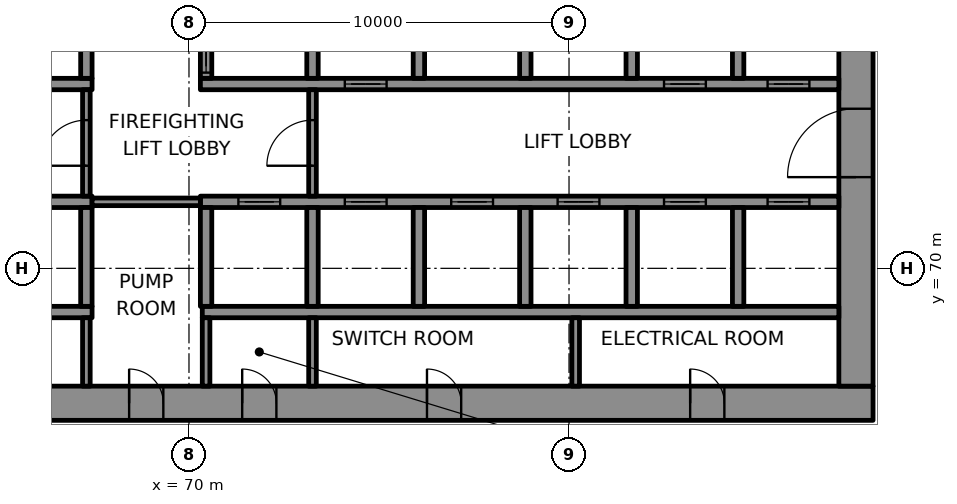
"""IFC4 building model, lengths in metres.
Left out: names, types, materials, properties, quantities, classifications, styles, units other than length and angle.
Written with IfcOpenShell. Run it as: python <this file> out.ifc"""

import sys

from ifc_helpers import new_model, si_unit, direction, frame, frame_2d, origin, place, context, subcontext, project, spatial, rectangle, extrude, element, fill, save


model = new_model("IFC4")
c1 = context("Model", 3, precision=1e-05, world=origin(), true_north=direction((0.0, 1.0)))
c2 = subcontext(c1, "Body", "Model", "MODEL_VIEW")
j1 = project(units=[si_unit("LENGTHUNIT", "METRE"), si_unit("PLANEANGLEUNIT", "RADIAN")], contexts=[c1])
p1 = place(None, origin())
s1 = spatial("IfcSite", under=j1, at=p1, CompositionType="ELEMENT")
p2 = place(p1, origin())
s2 = spatial("IfcBuilding", under=s1, at=p2, CompositionType="ELEMENT")
p3 = place(p2, frame((0.0, 0.0, 44.2)))
s3 = spatial("IfcBuildingStorey", under=s2, at=p3, CompositionType="ELEMENT", Elevation=44.2)
p4 = place(p3, frame((62.0, 66.45, 0.0), z_axis=(0.0, 0.0, 1.0), x_axis=(1.0, 0.0, 0.0)))
e1 = element("IfcWall", 1, at=p4, inside=s3, PredefinedType="SHEAR", context=c2, shape_type="SweptSolid", body=[
    extrude(rectangle(XDim=26.0, YDim=0.9, at=frame_2d((13.0, 0.0))), origin(), (0.0, 0.0, 1.0), 4.0),
])
p5 = place(p4, frame((3.45, 0.0, 0.0)))
e2 = element("IfcOpeningElement", 2, at=p5, cuts=e1, PredefinedType="OPENING", context=c2, shape_type="SweptSolid", body=[
    extrude(rectangle(XDim=0.9, YDim=2.1, at=frame_2d((0.45, 1.05))), frame((0.0, 0.46, 0.0), z_axis=(0.0, -1.0, 0.0), x_axis=(1.0, 0.0, 0.0)), (0.0, 0.0, 1.0), 0.92),
])
p6 = place(p4, frame((6.425, 0.0, 0.0)))
e3 = element("IfcOpeningElement", 3, at=p6, cuts=e1, PredefinedType="OPENING", context=c2, shape_type="SweptSolid", body=[
    extrude(rectangle(XDim=0.9, YDim=2.1, at=frame_2d((0.45, 1.05))), frame((0.0, 0.46, 0.0), z_axis=(0.0, -1.0, 0.0), x_axis=(1.0, 0.0, 0.0)), (0.0, 0.0, 1.0), 0.92),
])
p7 = place(p4, frame((9.4, 0.0, 0.0)))
e4 = element("IfcOpeningElement", 4, at=p7, cuts=e1, PredefinedType="OPENING", context=c2, shape_type="SweptSolid", body=[
    extrude(rectangle(XDim=0.9, YDim=2.1, at=frame_2d((0.45, 1.05))), frame((0.0, 0.46, 0.0), z_axis=(0.0, -1.0, 0.0), x_axis=(1.0, 0.0, 0.0)), (0.0, 0.0, 1.0), 0.92),
])
p8 = place(p4, frame((14.262, 0.0, 0.0)))
e5 = element("IfcOpeningElement", 5, at=p8, cuts=e1, PredefinedType="OPENING", context=c2, shape_type="SweptSolid", body=[
    extrude(rectangle(XDim=0.9, YDim=2.1, at=frame_2d((0.45, 1.05))), frame((0.0, 0.46, 0.0), z_axis=(0.0, -1.0, 0.0), x_axis=(1.0, 0.0, 0.0)), (0.0, 0.0, 1.0), 0.92),
])
p9 = place(p4, frame((21.188, 0.0, 0.0)))
e6 = element("IfcOpeningElement", 6, at=p9, cuts=e1, PredefinedType="OPENING", context=c2, shape_type="SweptSolid", body=[
    extrude(rectangle(XDim=0.9, YDim=2.1, at=frame_2d((0.45, 1.05))), frame((0.0, 0.46, 0.0), z_axis=(0.0, -1.0, 0.0), x_axis=(1.0, 0.0, 0.0)), (0.0, 0.0, 1.0), 0.92),
])
p10 = place(p3, frame((87.55, 66.9, 0.0), z_axis=(0.0, 0.0, 1.0), x_axis=(0.0, 1.0, 0.0)))
e7 = element("IfcWall", 7, at=p10, inside=s3, PredefinedType="SHEAR", context=c2, shape_type="SweptSolid", body=[
    extrude(rectangle(XDim=16.2, YDim=0.9, at=frame_2d((8.1, 0.0))), origin(), (0.0, 0.0, 1.0), 4.0),
])
p11 = place(p10, frame((5.5, 0.0, 0.0)))
e8 = element("IfcOpeningElement", 8, at=p11, cuts=e7, PredefinedType="OPENING", context=c2, shape_type="SweptSolid", body=[
    extrude(rectangle(XDim=1.8, YDim=2.1, at=frame_2d((0.9, 1.05))), frame((0.0, 0.46, 0.0), z_axis=(0.0, -1.0, 0.0), x_axis=(1.0, 0.0, 0.0)), (0.0, 0.0, 1.0), 0.92),
])
p12 = place(p10, frame((11.738, 0.0, 0.0)))
e9 = element("IfcOpeningElement", 9, at=p12, cuts=e7, PredefinedType="OPENING", context=c2, shape_type="SweptSolid", body=[
    extrude(rectangle(XDim=0.9, YDim=2.1, at=frame_2d((0.45, 1.05))), frame((0.0, 0.46, 0.0), z_axis=(0.0, -1.0, 0.0), x_axis=(1.0, 0.0, 0.0)), (0.0, 0.0, 1.0), 0.92),
])
p13 = place(p3, frame((64.35, 68.85, 0.0), z_axis=(0.0, 0.0, 1.0), x_axis=(1.0, 0.0, 0.0)))
e10 = element("IfcWall", 10, at=p13, inside=s3, PredefinedType="SHEAR", context=c2, shape_type="SweptSolid", body=[
    extrude(rectangle(XDim=3.1, YDim=0.3, at=frame_2d((1.55, 0.0))), origin(), (0.0, 0.0, 1.0), 4.0),
])
p14 = place(p3, frame((70.35, 68.85, 0.0), z_axis=(0.0, 0.0, 1.0), x_axis=(1.0, 0.0, 0.0)))
e11 = element("IfcWall", 11, at=p14, inside=s3, PredefinedType="SHEAR", context=c2, shape_type="SweptSolid", body=[
    extrude(rectangle(XDim=16.75, YDim=0.3, at=frame_2d((8.375, 0.0))), origin(), (0.0, 0.0, 1.0), 4.0),
])
p15 = place(p3, frame((64.35, 71.75, 0.0), z_axis=(0.0, 0.0, 1.0), x_axis=(1.0, 0.0, 0.0)))
e12 = element("IfcWall", 12, at=p15, inside=s3, PredefinedType="SHEAR", context=c2, shape_type="SweptSolid", body=[
    extrude(rectangle(XDim=3.1, YDim=0.3, at=frame_2d((1.55, 0.0))), origin(), (0.0, 0.0, 1.0), 4.0),
])
p16 = place(p3, frame((70.3, 71.75, 0.0), z_axis=(0.0, 0.0, 1.0), x_axis=(1.0, 0.0, 0.0)))
e13 = element("IfcWall", 13, at=p16, inside=s3, PredefinedType="SHEAR", context=c2, shape_type="SweptSolid", body=[
    extrude(rectangle(XDim=16.8, YDim=0.3, at=frame_2d((8.4, 0.0))), origin(), (0.0, 0.0, 1.0), 4.0),
])
p17 = place(p16, frame((1.0, 0.0, 0.0)))
e14 = element("IfcOpeningElement", 14, at=p17, cuts=e13, PredefinedType="OPENING", context=c2, shape_type="SweptSolid", body=[
    extrude(rectangle(XDim=1.1, YDim=2.1, at=frame_2d((0.55, 1.05))), frame((0.0, 0.16, 0.0), z_axis=(0.0, -1.0, 0.0), x_axis=(1.0, 0.0, 0.0)), (0.0, 0.0, 1.0), 0.32),
])
p18 = place(p16, frame((3.8, 0.0, 0.0)))
e15 = element("IfcOpeningElement", 15, at=p18, cuts=e13, PredefinedType="OPENING", context=c2, shape_type="SweptSolid", body=[
    extrude(rectangle(XDim=1.1, YDim=2.1, at=frame_2d((0.55, 1.05))), frame((0.0, 0.16, 0.0), z_axis=(0.0, -1.0, 0.0), x_axis=(1.0, 0.0, 0.0)), (0.0, 0.0, 1.0), 0.32),
])
p19 = place(p16, frame((6.6, 0.0, 0.0)))
e16 = element("IfcOpeningElement", 16, at=p19, cuts=e13, PredefinedType="OPENING", context=c2, shape_type="SweptSolid", body=[
    extrude(rectangle(XDim=1.1, YDim=2.1, at=frame_2d((0.55, 1.05))), frame((0.0, 0.16, 0.0), z_axis=(0.0, -1.0, 0.0), x_axis=(1.0, 0.0, 0.0)), (0.0, 0.0, 1.0), 0.32),
])
p20 = place(p16, frame((9.4, 0.0, 0.0)))
e17 = element("IfcOpeningElement", 17, at=p20, cuts=e13, PredefinedType="OPENING", context=c2, shape_type="SweptSolid", body=[
    extrude(rectangle(XDim=1.1, YDim=2.1, at=frame_2d((0.55, 1.05))), frame((0.0, 0.16, 0.0), z_axis=(0.0, -1.0, 0.0), x_axis=(1.0, 0.0, 0.0)), (0.0, 0.0, 1.0), 0.32),
])
p21 = place(p16, frame((12.2, 0.0, 0.0)))
e18 = element("IfcOpeningElement", 18, at=p21, cuts=e13, PredefinedType="OPENING", context=c2, shape_type="SweptSolid", body=[
    extrude(rectangle(XDim=1.1, YDim=2.1, at=frame_2d((0.55, 1.05))), frame((0.0, 0.16, 0.0), z_axis=(0.0, -1.0, 0.0), x_axis=(1.0, 0.0, 0.0)), (0.0, 0.0, 1.0), 0.32),
])
p22 = place(p16, frame((14.925, 0.0, 0.0)))
e19 = element("IfcOpeningElement", 19, at=p22, cuts=e13, PredefinedType="OPENING", context=c2, shape_type="SweptSolid", body=[
    extrude(rectangle(XDim=1.1, YDim=2.1, at=frame_2d((0.55, 1.05))), frame((0.0, 0.16, 0.0), z_axis=(0.0, -1.0, 0.0), x_axis=(1.0, 0.0, 0.0)), (0.0, 0.0, 1.0), 0.32),
])
p23 = place(p3, frame((64.35, 74.85, 0.0), z_axis=(0.0, 0.0, 1.0), x_axis=(1.0, 0.0, 0.0)))
e20 = element("IfcWall", 20, at=p23, inside=s3, PredefinedType="SHEAR", context=c2, shape_type="SweptSolid", body=[
    extrude(rectangle(XDim=3.1, YDim=0.3, at=frame_2d((1.55, 0.0))), origin(), (0.0, 0.0, 1.0), 4.0),
])
p24 = place(p3, frame((70.3, 74.85, 0.0), z_axis=(0.0, 0.0, 1.0), x_axis=(1.0, 0.0, 0.0)))
e21 = element("IfcWall", 21, at=p24, inside=s3, PredefinedType="SHEAR", context=c2, shape_type="SweptSolid", body=[
    extrude(rectangle(XDim=16.8, YDim=0.3, at=frame_2d((8.4, 0.0))), origin(), (0.0, 0.0, 1.0), 4.0),
])
p25 = place(p24, frame((3.8, 0.0, 0.0)))
e22 = element("IfcOpeningElement", 22, at=p25, cuts=e21, PredefinedType="OPENING", context=c2, shape_type="SweptSolid", body=[
    extrude(rectangle(XDim=1.1, YDim=2.1, at=frame_2d((0.55, 1.05))), frame((0.0, 0.16, 0.0), z_axis=(0.0, -1.0, 0.0), x_axis=(1.0, 0.0, 0.0)), (0.0, 0.0, 1.0), 0.32),
])
p26 = place(p24, frame((12.2, 0.0, 0.0)))
e23 = element("IfcOpeningElement", 23, at=p26, cuts=e21, PredefinedType="OPENING", context=c2, shape_type="SweptSolid", body=[
    extrude(rectangle(XDim=1.1, YDim=2.1, at=frame_2d((0.55, 1.05))), frame((0.0, 0.16, 0.0), z_axis=(0.0, -1.0, 0.0), x_axis=(1.0, 0.0, 0.0)), (0.0, 0.0, 1.0), 0.32),
])
p27 = place(p24, frame((14.925, 0.0, 0.0)))
e24 = element("IfcOpeningElement", 24, at=p27, cuts=e21, PredefinedType="OPENING", context=c2, shape_type="SweptSolid", body=[
    extrude(rectangle(XDim=1.1, YDim=2.1, at=frame_2d((0.55, 1.05))), frame((0.0, 0.16, 0.0), z_axis=(0.0, -1.0, 0.0), x_axis=(1.0, 0.0, 0.0)), (0.0, 0.0, 1.0), 0.32),
])
for number, where, z_axis, x_axis in (
    (25, (67.3, 69.0, 0.0), (0.0, 0.0, 1.0), (0.0, 1.0, 0.0)),
    (26, (67.3, 75.0, 0.0), (0.0, 0.0, 1.0), (0.0, 1.0, 0.0)),
    (27, (70.45, 69.0, 0.0), (0.0, 0.0, 1.0), (0.0, 1.0, 0.0)),
):
    element("IfcWall", number, at=place(p3, frame(where, z_axis=z_axis, x_axis=x_axis)), inside=s3, PredefinedType="SHEAR", context=c2, shape_type="SweptSolid", body=[
        extrude(rectangle(XDim=2.6, YDim=0.3, at=frame_2d((1.3, 0.0))), origin(), (0.0, 0.0, 1.0), 4.0),
    ])
p28 = place(p3, frame((70.45, 75.0, 0.0), z_axis=(0.0, 0.0, 1.0), x_axis=(0.0, 1.0, 0.0)))
e28 = element("IfcWall", 28, at=p28, inside=s3, PredefinedType="SHEAR", context=c2, shape_type="SweptSolid", body=[
    extrude(rectangle(XDim=2.6, YDim=0.3, at=frame_2d((1.3, 0.0))), origin(), (0.0, 0.0, 1.0), 4.0),
])
p29 = place(p28, frame((0.15, 0.0, 0.0)))
e29 = element("IfcOpeningElement", 29, at=p29, cuts=e28, PredefinedType="OPENING", context=c2, shape_type="SweptSolid", body=[
    extrude(rectangle(XDim=1.1, YDim=2.1, at=frame_2d((0.55, 1.05))), frame((0.0, 0.16, 0.0), z_axis=(0.0, -1.0, 0.0), x_axis=(1.0, 0.0, 0.0)), (0.0, 0.0, 1.0), 0.32),
])
for number, where, z_axis, x_axis in (
    (30, (73.25, 69.0, 0.0), (0.0, 0.0, 1.0), (0.0, 1.0, 0.0)),
    (31, (73.25, 75.0, 0.0), (0.0, 0.0, 1.0), (0.0, 1.0, 0.0)),
    (32, (76.05, 69.0, 0.0), (0.0, 0.0, 1.0), (0.0, 1.0, 0.0)),
    (33, (76.05, 75.0, 0.0), (0.0, 0.0, 1.0), (0.0, 1.0, 0.0)),
    (34, (78.85, 69.0, 0.0), (0.0, 0.0, 1.0), (0.0, 1.0, 0.0)),
    (35, (78.85, 75.0, 0.0), (0.0, 0.0, 1.0), (0.0, 1.0, 0.0)),
    (36, (81.65, 69.0, 0.0), (0.0, 0.0, 1.0), (0.0, 1.0, 0.0)),
    (37, (81.65, 75.0, 0.0), (0.0, 0.0, 1.0), (0.0, 1.0, 0.0)),
    (38, (84.45, 69.0, 0.0), (0.0, 0.0, 1.0), (0.0, 1.0, 0.0)),
    (39, (84.45, 75.0, 0.0), (0.0, 0.0, 1.0), (0.0, 1.0, 0.0)),
):
    element("IfcWall", number, at=place(p3, frame(where, z_axis=z_axis, x_axis=x_axis)), inside=s3, PredefinedType="SHEAR", context=c2, shape_type="SweptSolid", body=[
        extrude(rectangle(XDim=2.6, YDim=0.3, at=frame_2d((1.3, 0.0))), origin(), (0.0, 0.0, 1.0), 4.0),
    ])
p30 = place(p3, frame((67.45, 71.75, 0.0), z_axis=(0.0, 0.0, 1.0), x_axis=(1.0, 0.0, 0.0)))
e40 = element("IfcWall", 40, at=p30, inside=s3, PredefinedType="PARTITIONING", context=c2, shape_type="SweptSolid", body=[
    extrude(rectangle(XDim=2.85, YDim=0.2, at=frame_2d((1.425, 0.0))), origin(), (0.0, 0.0, 1.0), 4.0),
])
p31 = place(p3, frame((67.3, 66.9, 0.0), z_axis=(0.0, 0.0, 1.0), x_axis=(0.0, 1.0, 0.0)))
e41 = element("IfcWall", 41, at=p31, inside=s3, PredefinedType="PARTITIONING", context=c2, shape_type="SweptSolid", body=[
    extrude(rectangle(XDim=1.8, YDim=0.2, at=frame_2d((0.9, 0.0))), origin(), (0.0, 0.0, 1.0), 4.0),
])
p32 = place(p3, frame((67.3, 71.9, 0.0), z_axis=(0.0, 0.0, 1.0), x_axis=(0.0, 1.0, 0.0)))
e42 = element("IfcWall", 42, at=p32, inside=s3, PredefinedType="PARTITIONING", context=c2, shape_type="SweptSolid", body=[
    extrude(rectangle(XDim=2.8, YDim=0.2, at=frame_2d((1.4, 0.0))), origin(), (0.0, 0.0, 1.0), 4.0),
])
p33 = place(p32, frame((0.8, 0.0, 0.0)))
e43 = element("IfcOpeningElement", 43, at=p33, cuts=e42, PredefinedType="OPENING", context=c2, shape_type="SweptSolid", body=[
    extrude(rectangle(XDim=1.2, YDim=2.1, at=frame_2d((0.6, 1.05))), frame((0.0, 0.11, 0.0), z_axis=(0.0, -1.0, 0.0), x_axis=(1.0, 0.0, 0.0)), (0.0, 0.0, 1.0), 0.22),
])
for number, where, z_axis, x_axis in (
    (44, (70.45, 66.9, 0.0), (0.0, 0.0, 1.0), (0.0, 1.0, 0.0)),
    (45, (73.25, 66.9, 0.0), (0.0, 0.0, 1.0), (0.0, 1.0, 0.0)),
):
    element("IfcWall", number, at=place(p3, frame(where, z_axis=z_axis, x_axis=x_axis)), inside=s3, PredefinedType="PARTITIONING", context=c2, shape_type="SweptSolid", body=[
        extrude(rectangle(XDim=1.8, YDim=0.2, at=frame_2d((0.9, 0.0))), origin(), (0.0, 0.0, 1.0), 4.0),
    ])
p34 = place(p3, frame((73.25, 71.9, 0.0), z_axis=(0.0, 0.0, 1.0), x_axis=(0.0, 1.0, 0.0)))
e46 = element("IfcWall", 46, at=p34, inside=s3, PredefinedType="PARTITIONING", context=c2, shape_type="SweptSolid", body=[
    extrude(rectangle(XDim=2.8, YDim=0.2, at=frame_2d((1.4, 0.0))), origin(), (0.0, 0.0, 1.0), 4.0),
])
p35 = place(p34, frame((0.8, 0.0, 0.0)))
e47 = element("IfcOpeningElement", 47, at=p35, cuts=e46, PredefinedType="OPENING", context=c2, shape_type="SweptSolid", body=[
    extrude(rectangle(XDim=1.2, YDim=2.1, at=frame_2d((0.6, 1.05))), frame((0.0, 0.11, 0.0), z_axis=(0.0, -1.0, 0.0), x_axis=(1.0, 0.0, 0.0)), (0.0, 0.0, 1.0), 0.22),
])
p36 = place(p3, frame((80.175, 66.9, 0.0), z_axis=(0.0, 0.0, 1.0), x_axis=(0.0, 1.0, 0.0)))
e48 = element("IfcWall", 48, at=p36, inside=s3, PredefinedType="PARTITIONING", context=c2, shape_type="SweptSolid", body=[
    extrude(rectangle(XDim=1.8, YDim=0.2, at=frame_2d((0.9, 0.0))), origin(), (0.0, 0.0, 1.0), 4.0),
])
p37 = place(p17, origin())
e49 = element("IfcDoor", 49, at=p37, inside=s3, OperationType="DOUBLE_DOOR_SLIDING", PredefinedType="DOOR", context=c2, shape_type="SweptSolid", body=[
    extrude(rectangle(XDim=1.1, YDim=2.1, at=frame_2d((0.55, 1.05))), frame((0.0, 0.025, 0.0), z_axis=(0.0, -1.0, 0.0), x_axis=(1.0, 0.0, 0.0)), (0.0, 0.0, 1.0), 0.05),
])
fill(e14, e49)
p38 = place(p18, origin())
e50 = element("IfcDoor", 50, at=p38, inside=s3, OperationType="DOUBLE_DOOR_SLIDING", PredefinedType="DOOR", context=c2, shape_type="SweptSolid", body=[
    extrude(rectangle(XDim=1.1, YDim=2.1, at=frame_2d((0.55, 1.05))), frame((0.0, 0.025, 0.0), z_axis=(0.0, -1.0, 0.0), x_axis=(1.0, 0.0, 0.0)), (0.0, 0.0, 1.0), 0.05),
])
fill(e15, e50)
p39 = place(p19, origin())
e51 = element("IfcDoor", 51, at=p39, inside=s3, OperationType="DOUBLE_DOOR_SLIDING", PredefinedType="DOOR", context=c2, shape_type="SweptSolid", body=[
    extrude(rectangle(XDim=1.1, YDim=2.1, at=frame_2d((0.55, 1.05))), frame((0.0, 0.025, 0.0), z_axis=(0.0, -1.0, 0.0), x_axis=(1.0, 0.0, 0.0)), (0.0, 0.0, 1.0), 0.05),
])
fill(e16, e51)
p40 = place(p20, origin())
e52 = element("IfcDoor", 52, at=p40, inside=s3, OperationType="DOUBLE_DOOR_SLIDING", PredefinedType="DOOR", context=c2, shape_type="SweptSolid", body=[
    extrude(rectangle(XDim=1.1, YDim=2.1, at=frame_2d((0.55, 1.05))), frame((0.0, 0.025, 0.0), z_axis=(0.0, -1.0, 0.0), x_axis=(1.0, 0.0, 0.0)), (0.0, 0.0, 1.0), 0.05),
])
fill(e17, e52)
p41 = place(p21, origin())
e53 = element("IfcDoor", 53, at=p41, inside=s3, OperationType="DOUBLE_DOOR_SLIDING", PredefinedType="DOOR", context=c2, shape_type="SweptSolid", body=[
    extrude(rectangle(XDim=1.1, YDim=2.1, at=frame_2d((0.55, 1.05))), frame((0.0, 0.025, 0.0), z_axis=(0.0, -1.0, 0.0), x_axis=(1.0, 0.0, 0.0)), (0.0, 0.0, 1.0), 0.05),
])
fill(e18, e53)
p42 = place(p22, origin())
e54 = element("IfcDoor", 54, at=p42, inside=s3, OperationType="DOUBLE_DOOR_SLIDING", PredefinedType="DOOR", context=c2, shape_type="SweptSolid", body=[
    extrude(rectangle(XDim=1.1, YDim=2.1, at=frame_2d((0.55, 1.05))), frame((0.0, 0.025, 0.0), z_axis=(0.0, -1.0, 0.0), x_axis=(1.0, 0.0, 0.0)), (0.0, 0.0, 1.0), 0.05),
])
fill(e19, e54)
p43 = place(p29, origin())
e55 = element("IfcDoor", 55, at=p43, inside=s3, OperationType="DOUBLE_DOOR_SLIDING", PredefinedType="DOOR", context=c2, shape_type="SweptSolid", body=[
    extrude(rectangle(XDim=1.1, YDim=2.1, at=frame_2d((0.55, 1.05))), frame((0.0, 0.025, 0.0), z_axis=(0.0, -1.0, 0.0), x_axis=(1.0, 0.0, 0.0)), (0.0, 0.0, 1.0), 0.05),
])
fill(e29, e55)
p44 = place(p25, origin())
e56 = element("IfcDoor", 56, at=p44, inside=s3, OperationType="DOUBLE_DOOR_SLIDING", PredefinedType="DOOR", context=c2, shape_type="SweptSolid", body=[
    extrude(rectangle(XDim=1.1, YDim=2.1, at=frame_2d((0.55, 1.05))), frame((0.0, 0.025, 0.0), z_axis=(0.0, -1.0, 0.0), x_axis=(1.0, 0.0, 0.0)), (0.0, 0.0, 1.0), 0.05),
])
fill(e22, e56)
p45 = place(p26, origin())
e57 = element("IfcDoor", 57, at=p45, inside=s3, OperationType="DOUBLE_DOOR_SLIDING", PredefinedType="DOOR", context=c2, shape_type="SweptSolid", body=[
    extrude(rectangle(XDim=1.1, YDim=2.1, at=frame_2d((0.55, 1.05))), frame((0.0, 0.025, 0.0), z_axis=(0.0, -1.0, 0.0), x_axis=(1.0, 0.0, 0.0)), (0.0, 0.0, 1.0), 0.05),
])
fill(e23, e57)
p46 = place(p27, origin())
e58 = element("IfcDoor", 58, at=p46, inside=s3, OperationType="DOUBLE_DOOR_SLIDING", PredefinedType="DOOR", context=c2, shape_type="SweptSolid", body=[
    extrude(rectangle(XDim=1.1, YDim=2.1, at=frame_2d((0.55, 1.05))), frame((0.0, 0.025, 0.0), z_axis=(0.0, -1.0, 0.0), x_axis=(1.0, 0.0, 0.0)), (0.0, 0.0, 1.0), 0.05),
])
fill(e24, e58)
p47 = place(p35, origin())
e59 = element("IfcDoor", 59, at=p47, inside=s3, OperationType="SINGLE_SWING_LEFT", PredefinedType="DOOR", context=c2, shape_type="SweptSolid", body=[
    extrude(rectangle(XDim=1.2, YDim=2.1, at=frame_2d((0.6, 1.05))), frame((0.0, 0.025, 0.0), z_axis=(0.0, -1.0, 0.0), x_axis=(1.0, 0.0, 0.0)), (0.0, 0.0, 1.0), 0.05),
])
fill(e47, e59)
p48 = place(p33, origin())
e60 = element("IfcDoor", 60, at=p48, inside=s3, OperationType="SINGLE_SWING_RIGHT", PredefinedType="DOOR", context=c2, shape_type="SweptSolid", body=[
    extrude(rectangle(XDim=1.2, YDim=2.1, at=frame_2d((0.6, 1.05))), frame((0.0, 0.025, 0.0), z_axis=(0.0, -1.0, 0.0), x_axis=(1.0, 0.0, 0.0)), (0.0, 0.0, 1.0), 0.05),
])
fill(e43, e60)
p49 = place(p11, origin())
e61 = element("IfcDoor", 61, at=p49, inside=s3, OperationType="SINGLE_SWING_RIGHT", PredefinedType="DOOR", context=c2, shape_type="SweptSolid", body=[
    extrude(rectangle(XDim=1.8, YDim=2.1, at=frame_2d((0.9, 1.05))), frame((0.0, 0.17, 0.0), z_axis=(0.0, -1.0, 0.0), x_axis=(1.0, 0.0, 0.0)), (0.0, 0.0, 1.0), 0.34),
])
fill(e8, e61)
p50 = place(p6, origin())
e62 = element("IfcDoor", 62, at=p50, inside=s3, OperationType="SINGLE_SWING_RIGHT", PredefinedType="DOOR", context=c2, shape_type="SweptSolid", body=[
    extrude(rectangle(XDim=0.9, YDim=2.1, at=frame_2d((0.45, 1.05))), frame((0.0, 0.17, 0.0), z_axis=(0.0, -1.0, 0.0), x_axis=(1.0, 0.0, 0.0)), (0.0, 0.0, 1.0), 0.34),
])
fill(e3, e62)
p51 = place(p7, origin())
e63 = element("IfcDoor", 63, at=p51, inside=s3, OperationType="SINGLE_SWING_LEFT", PredefinedType="DOOR", context=c2, shape_type="SweptSolid", body=[
    extrude(rectangle(XDim=0.9, YDim=2.1, at=frame_2d((0.45, 1.05))), frame((0.0, 0.17, 0.0), z_axis=(0.0, -1.0, 0.0), x_axis=(1.0, 0.0, 0.0)), (0.0, 0.0, 1.0), 0.34),
])
fill(e4, e63)
p52 = place(p8, origin())
e64 = element("IfcDoor", 64, at=p52, inside=s3, OperationType="SINGLE_SWING_RIGHT", PredefinedType="DOOR", context=c2, shape_type="SweptSolid", body=[
    extrude(rectangle(XDim=0.9, YDim=2.1, at=frame_2d((0.45, 1.05))), frame((0.0, 0.17, 0.0), z_axis=(0.0, -1.0, 0.0), x_axis=(1.0, 0.0, 0.0)), (0.0, 0.0, 1.0), 0.34),
])
fill(e5, e64)
p53 = place(p9, origin())
e65 = element("IfcDoor", 65, at=p53, inside=s3, OperationType="SINGLE_SWING_LEFT", PredefinedType="DOOR", context=c2, shape_type="SweptSolid", body=[
    extrude(rectangle(XDim=0.9, YDim=2.1, at=frame_2d((0.45, 1.05))), frame((0.0, 0.17, 0.0), z_axis=(0.0, -1.0, 0.0), x_axis=(1.0, 0.0, 0.0)), (0.0, 0.0, 1.0), 0.34),
])
fill(e6, e65)
save(model, sys.argv[1])
